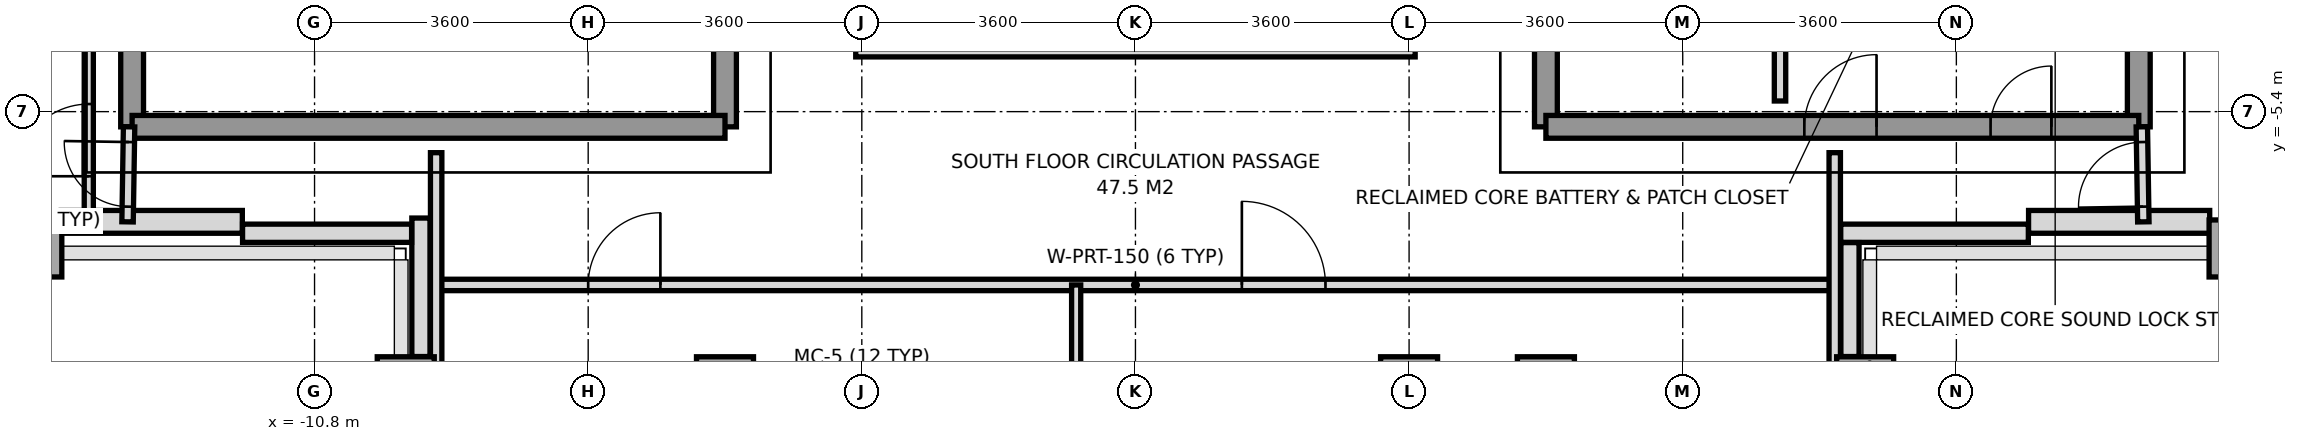
"""IFC4 building model, lengths in metres.
Left out: names, types, materials, properties, quantities, classifications, styles, units other than length and angle.
Written with IfcOpenShell. Run it as: python <this file> out.ifc"""

import sys

from ifc_helpers import new_model, si_unit, direction, frame, frame_2d, origin, origin_2d, place, context, subcontext, project, spatial, rectangle, extrude, source, transform, mapped, element, fill, save


model = new_model("IFC4")
c1 = context("Model", 3, precision=1e-05, world=origin(), true_north=direction((0.0, 1.0)))
c2 = subcontext(c1, "Body", "Model", "MODEL_VIEW")
j1 = project(units=[si_unit("LENGTHUNIT", "METRE"), si_unit("PLANEANGLEUNIT", "RADIAN")], contexts=[c1])
p1 = place(None, origin())
s1 = spatial("IfcSite", under=j1, at=p1, CompositionType="ELEMENT")
p2 = place(p1, origin())
s2 = spatial("IfcBuilding", under=s1, at=p2, CompositionType="ELEMENT")
p3 = place(p2, frame((0.0, 0.0, 233.2)))
s3 = spatial("IfcBuildingStorey", under=s2, at=p3, CompositionType="ELEMENT", Elevation=233.2)
m1 = source(origin(), c2, "Body", "SweptSolid", [
    extrude(rectangle(XDim=0.55, YDim=0.75, at=origin_2d()), origin(), (0.0, 0.0, 1.0), 3.01),
])
p4 = place(p3, frame((-14.4, -7.2, 0.0), z_axis=(0.0, 0.0, 1.0), x_axis=(1.0, 0.0, 0.0)))
e1 = element("IfcColumn", 1, at=p4, inside=s3, PredefinedType="COLUMN", context=c2, shape_type="MappedRepresentation", body=[
    mapped(m1, transform((0.0, 0.0, 0.0), x_axis=(1.0, 0.0, 0.0), y_axis=(0.0, 1.0, 0.0), z_axis=(0.0, 0.0, 1.0), scale=1.0)),
])
m2 = source(origin(), c2, "Body", "SweptSolid", [
    extrude(rectangle(XDim=0.75, YDim=0.75, at=origin_2d()), origin(), (0.0, 0.0, 1.0), 3.01),
])
for number, where, z_axis, x_axis in (
    (2, (-9.6, -9.0, 0.0), (0.0, 0.0, 1.0), (1.0, 0.0, 0.0)),
    (3, (-5.4, -9.0, 0.0), (0.0, 0.0, 1.0), (1.0, 0.0, 0.0)),
    (4, (-3.6, -9.0, 0.0), (0.0, 0.0, 1.0), (1.0, 0.0, 0.0)),
    (5, (3.6, -9.0, 0.0), (0.0, 0.0, 1.0), (1.0, 0.0, 0.0)),
    (6, (5.4, -9.0, 0.0), (0.0, 0.0, 1.0), (1.0, 0.0, 0.0)),
    (7, (9.6, -9.0, 0.0), (0.0, 0.0, 1.0), (1.0, 0.0, 0.0)),
):
    element("IfcColumn", number, at=place(p3, frame(where, z_axis=z_axis, x_axis=x_axis)), inside=s3, PredefinedType="COLUMN", context=c2, shape_type="MappedRepresentation", body=[
        mapped(m2, transform((0.0, 0.0, 0.0), x_axis=(1.0, 0.0, 0.0), y_axis=(0.0, 1.0, 0.0), z_axis=(0.0, 0.0, 1.0), scale=1.0)),
    ])
p5 = place(p3, frame((14.4, -7.2, 0.0), z_axis=(0.0, 0.0, 1.0), x_axis=(1.0, 0.0, 0.0)))
e8 = element("IfcColumn", 8, at=p5, inside=s3, PredefinedType="COLUMN", context=c2, shape_type="MappedRepresentation", body=[
    mapped(m1, transform((0.0, 0.0, 0.0), x_axis=(1.0, 0.0, 0.0), y_axis=(0.0, 1.0, 0.0), z_axis=(0.0, 0.0, 1.0), scale=1.0)),
])
for number, where, z_axis, x_axis in (
    (9, (-14.133, -6.85, 0.0), (0.0, 0.0, 1.0), (1.0, 0.0, 0.0)),
    (10, (11.75, -6.85, 0.0), (0.0, 0.0, 1.0), (1.0, 0.0, 0.0)),
):
    element("IfcWall", number, at=place(p3, frame(where, z_axis=z_axis, x_axis=x_axis)), inside=s3, PredefinedType="SOLIDWALL", context=c2, shape_type="SweptSolid", body=[
        extrude(rectangle(XDim=2.383, YDim=0.3, at=frame_2d((1.191, 0.0))), origin(), (0.0, 0.0, 1.0), 2.57),
    ])
p6 = place(p3, frame((11.747, -7.0, 0.0), z_axis=(0.0, 0.0, 1.0), x_axis=(-1.0, 0.0, 0.0)))
e11 = element("IfcWall", 11, at=p6, inside=s3, PredefinedType="PARAPET", context=c2, shape_type="SweptSolid", body=[
    extrude(rectangle(XDim=2.469, YDim=0.24, at=frame_2d((1.234, 0.0))), origin(), (0.0, 0.0, 1.0), 1.15),
])
p7 = place(p3, frame((9.4, -7.123, 0.0), z_axis=(0.0, 0.0, 1.0), x_axis=(0.0, -1.0, 0.0)))
e12 = element("IfcWall", 12, at=p7, inside=s3, PredefinedType="PARAPET", context=c2, shape_type="SweptSolid", body=[
    extrude(rectangle(XDim=1.499, YDim=0.24, at=frame_2d((0.75, 0.0))), origin(), (0.0, 0.0, 1.0), 1.15),
])
p8 = place(p3, frame((-9.4, -8.622, 0.0), z_axis=(0.0, 0.0, 1.0), x_axis=(0.0, 1.0, 0.0)))
e13 = element("IfcWall", 13, at=p8, inside=s3, PredefinedType="PARAPET", context=c2, shape_type="SweptSolid", body=[
    extrude(rectangle(XDim=1.822, YDim=0.24, at=frame_2d((0.911, 0.0))), origin(), (0.0, 0.0, 1.0), 1.15),
])
p9 = place(p3, frame((-9.523, -7.0, 0.0), z_axis=(0.0, 0.0, 1.0), x_axis=(-1.0, 0.0, 0.0)))
e14 = element("IfcWall", 14, at=p9, inside=s3, PredefinedType="PARAPET", context=c2, shape_type="SweptSolid", body=[
    extrude(rectangle(XDim=2.224, YDim=0.24, at=frame_2d((1.112, 0.0))), origin(), (0.0, 0.0, 1.0), 1.15),
])
p10 = place(p3, frame((-13.2, -5.6, 0.0), z_axis=(0.0, 0.0, 1.0), x_axis=(0.0, 1.0, 0.0)))
e15 = element("IfcWall", 15, at=p10, inside=s3, PredefinedType="SHEAR", context=c2, shape_type="SweptSolid", body=[
    extrude(rectangle(XDim=11.2, YDim=0.3, at=frame_2d((5.6, 0.0))), origin(), (0.0, 0.0, 1.0), 3.01),
])
p11 = place(p3, frame((-5.4, -5.6, 0.0), z_axis=(0.0, 0.0, 1.0), x_axis=(0.0, 1.0, 0.0)))
e16 = element("IfcWall", 16, at=p11, inside=s3, PredefinedType="SHEAR", context=c2, shape_type="SweptSolid", body=[
    extrude(rectangle(XDim=12.5, YDim=0.3, at=frame_2d((6.25, 0.0))), origin(), (0.0, 0.0, 1.0), 3.01),
])
p12 = place(p11, frame((4.55, 0.0, 0.0)))
e17 = element("IfcOpeningElement", 17, at=p12, cuts=e16, PredefinedType="OPENING", context=c2, shape_type="SweptSolid", body=[
    extrude(rectangle(XDim=1.2, YDim=2.2, at=frame_2d((0.6, 1.1))), frame((0.0, 0.16, 0.0), z_axis=(0.0, -1.0, 0.0), x_axis=(1.0, 0.0, 0.0)), (0.0, 0.0, 1.0), 0.32),
])
p13 = place(p11, frame((10.45, 0.0, 0.0)))
e18 = element("IfcOpeningElement", 18, at=p13, cuts=e16, PredefinedType="OPENING", context=c2, shape_type="SweptSolid", body=[
    extrude(rectangle(XDim=1.2, YDim=2.2, at=frame_2d((0.6, 1.1))), frame((0.0, 0.16, 0.0), z_axis=(0.0, -1.0, 0.0), x_axis=(1.0, 0.0, 0.0)), (0.0, 0.0, 1.0), 0.32),
])
p14 = place(p3, frame((-13.2, -5.6, 0.0), z_axis=(0.0, 0.0, 1.0), x_axis=(1.0, 0.0, 0.0)))
e19 = element("IfcWall", 19, at=p14, inside=s3, PredefinedType="SHEAR", context=c2, shape_type="SweptSolid", body=[
    extrude(rectangle(XDim=7.8, YDim=0.3, at=frame_2d((3.9, 0.0))), origin(), (0.0, 0.0, 1.0), 3.01),
])
p15 = place(p3, frame((13.2, -5.6, 0.0), z_axis=(0.0, 0.0, 1.0), x_axis=(0.0, 1.0, 0.0)))
e20 = element("IfcWall", 20, at=p15, inside=s3, PredefinedType="SHEAR", context=c2, shape_type="SweptSolid", body=[
    extrude(rectangle(XDim=11.2, YDim=0.3, at=frame_2d((5.6, 0.0))), origin(), (0.0, 0.0, 1.0), 3.01),
])
p16 = place(p3, frame((5.4, -5.6, 0.0), z_axis=(0.0, 0.0, 1.0), x_axis=(0.0, 1.0, 0.0)))
e21 = element("IfcWall", 21, at=p16, inside=s3, PredefinedType="SHEAR", context=c2, shape_type="SweptSolid", body=[
    extrude(rectangle(XDim=12.5, YDim=0.3, at=frame_2d((6.25, 0.0))), origin(), (0.0, 0.0, 1.0), 3.01),
])
p17 = place(p16, frame((4.55, 0.0, 0.0)))
e22 = element("IfcOpeningElement", 22, at=p17, cuts=e21, PredefinedType="OPENING", context=c2, shape_type="SweptSolid", body=[
    extrude(rectangle(XDim=1.2, YDim=2.2, at=frame_2d((0.6, 1.1))), frame((0.0, 0.16, 0.0), z_axis=(0.0, -1.0, 0.0), x_axis=(1.0, 0.0, 0.0)), (0.0, 0.0, 1.0), 0.32),
])
p18 = place(p16, frame((10.45, 0.0, 0.0)))
e23 = element("IfcOpeningElement", 23, at=p18, cuts=e21, PredefinedType="OPENING", context=c2, shape_type="SweptSolid", body=[
    extrude(rectangle(XDim=1.2, YDim=2.2, at=frame_2d((0.6, 1.1))), frame((0.0, 0.16, 0.0), z_axis=(0.0, -1.0, 0.0), x_axis=(1.0, 0.0, 0.0)), (0.0, 0.0, 1.0), 0.32),
])
p19 = place(p16, frame((7.88, 0.0, 0.0)))
e24 = element("IfcOpeningElement", 24, at=p19, cuts=e21, PredefinedType="OPENING", context=c2, shape_type="SweptSolid", body=[
    extrude(rectangle(XDim=0.8, YDim=2.1, at=frame_2d((0.4, 1.05))), frame((0.0, 0.16, 0.0), z_axis=(0.0, -1.0, 0.0), x_axis=(1.0, 0.0, 0.0)), (0.0, 0.0, 1.0), 0.32),
])
p20 = place(p3, frame((5.4, -5.6, 0.0), z_axis=(0.0, 0.0, 1.0), x_axis=(1.0, 0.0, 0.0)))
e25 = element("IfcWall", 25, at=p20, inside=s3, PredefinedType="SHEAR", context=c2, shape_type="SweptSolid", body=[
    extrude(rectangle(XDim=7.8, YDim=0.3, at=frame_2d((3.9, 0.0))), origin(), (0.0, 0.0, 1.0), 3.01),
])
p21 = place(p20, frame((5.85, 0.0, 0.0)))
e26 = element("IfcOpeningElement", 26, at=p21, cuts=e25, PredefinedType="OPENING", context=c2, shape_type="SweptSolid", body=[
    extrude(rectangle(XDim=0.8, YDim=2.1, at=frame_2d((0.4, 1.05))), frame((0.0, 0.16, 0.0), z_axis=(0.0, -1.0, 0.0), x_axis=(1.0, 0.0, 0.0)), (0.0, 0.0, 1.0), 0.32),
])
p22 = place(p20, frame((3.4, 0.0, 0.0)))
e27 = element("IfcOpeningElement", 27, at=p22, cuts=e25, PredefinedType="OPENING", context=c2, shape_type="SweptSolid", body=[
    extrude(rectangle(XDim=0.95, YDim=2.15, at=frame_2d((0.475, 1.075))), frame((0.0, 0.16, 0.0), z_axis=(0.0, -1.0, 0.0), x_axis=(1.0, 0.0, 0.0)), (0.0, 0.0, 1.0), 0.32),
])
p23 = place(p3, frame((8.48, -5.26, 0.0), z_axis=(0.0, 0.0, 1.0), x_axis=(0.0, 1.0, 0.0)))
e28 = element("IfcWall", 28, at=p23, inside=s3, PredefinedType="PARTITIONING", context=c2, shape_type="SweptSolid", body=[
    extrude(rectangle(XDim=2.94, YDim=0.15, at=frame_2d((1.47, 0.0))), origin(), (0.0, 0.0, 1.0), 3.01),
])
p24 = place(p3, frame((-9.2, -7.68, 0.0), z_axis=(0.0, 0.0, 1.0), x_axis=(1.0, 0.0, 0.0)))
e29 = element("IfcWall", 29, at=p24, inside=s3, PredefinedType="PARTITIONING", context=c2, shape_type="SweptSolid", body=[
    extrude(rectangle(XDim=18.4, YDim=0.15, at=frame_2d((9.2, 0.0))), origin(), (0.0, 0.0, 1.0), 2.57),
])
p25 = place(p24, frame((2.0, 0.0, 0.0)))
e30 = element("IfcOpeningElement", 30, at=p25, cuts=e29, PredefinedType="OPENING", context=c2, shape_type="SweptSolid", body=[
    extrude(rectangle(XDim=0.95, YDim=2.15, at=frame_2d((0.475, 1.075))), frame((0.0, 0.085, 0.0), z_axis=(0.0, -1.0, 0.0), x_axis=(1.0, 0.0, 0.0)), (0.0, 0.0, 1.0), 0.17),
])
p26 = place(p24, frame((10.6, 0.0, 0.0)))
e31 = element("IfcOpeningElement", 31, at=p26, cuts=e29, PredefinedType="OPENING", context=c2, shape_type="SweptSolid", body=[
    extrude(rectangle(XDim=1.1, YDim=2.2, at=frame_2d((0.55, 1.1))), frame((0.0, 0.085, 0.0), z_axis=(0.0, -1.0, 0.0), x_axis=(1.0, 0.0, 0.0)), (0.0, 0.0, 1.0), 0.17),
])
for number, where, z_axis, x_axis in (
    (32, (-9.2, -10.28, 0.0), (0.0, 0.0, 1.0), (0.0, 1.0, 0.0)),
    (33, (9.2, -10.28, 0.0), (0.0, 0.0, 1.0), (0.0, 1.0, 0.0)),
):
    element("IfcWall", number, at=place(p3, frame(where, z_axis=z_axis, x_axis=x_axis)), inside=s3, PredefinedType="PARTITIONING", context=c2, shape_type="SweptSolid", body=[
        extrude(rectangle(XDim=4.34, YDim=0.15, at=frame_2d((2.17, 0.0))), origin(), (0.0, 0.0, 1.0), 2.61),
    ])
p27 = place(p3, frame((-0.78, -19.25, 0.0), z_axis=(0.0, 0.0, 1.0), x_axis=(0.0, 1.0, 0.0)))
e34 = element("IfcWall", 34, at=p27, inside=s3, PredefinedType="PARTITIONING", context=c2, shape_type="SweptSolid", body=[
    extrude(rectangle(XDim=11.57, YDim=0.12, at=frame_2d((5.785, 0.0))), origin(), (0.0, 0.0, 1.0), 2.61),
])
p28 = place(p3, frame((-13.26, -6.85, 0.0), z_axis=(0.0, 0.0, 1.0), x_axis=(0.016013571389, 0.999871774545, 0.0)))
e35 = element("IfcWall", 35, at=p28, inside=s3, PredefinedType="PARTITIONING", context=c2, shape_type="SweptSolid", body=[
    extrude(rectangle(XDim=1.25, YDim=0.15, at=frame_2d((0.625, 0.0))), origin(), (0.0, 0.0, 1.0), 3.01),
])
p29 = place(p28, frame((0.2, 0.0, 0.0)))
e36 = element("IfcOpeningElement", 36, at=p29, cuts=e35, PredefinedType="OPENING", context=c2, shape_type="SweptSolid", body=[
    extrude(rectangle(XDim=0.85, YDim=2.1, at=frame_2d((0.425, 1.05))), frame((0.0, 0.085, 0.0), z_axis=(0.0, -1.0, 0.0), x_axis=(1.0, 0.0, 0.0)), (0.0, 0.0, 1.0), 0.17),
])
p30 = place(p3, frame((-13.77, -6.85, 0.0), z_axis=(0.0, 0.0, 1.0), x_axis=(0.0, 1.0, 0.0)))
e37 = element("IfcWall", 37, at=p30, inside=s3, PredefinedType="PARTITIONING", context=c2, shape_type="SweptSolid", body=[
    extrude(rectangle(XDim=13.7, YDim=0.12, at=frame_2d((6.85, 0.0))), origin(), (0.0, 0.0, 1.0), 2.71),
])
p31 = place(p30, frame((0.6, 0.0, 0.0)))
e38 = element("IfcOpeningElement", 38, at=p31, cuts=e37, PredefinedType="OPENING", context=c2, shape_type="SweptSolid", body=[
    extrude(rectangle(XDim=0.95, YDim=2.15, at=frame_2d((0.475, 1.075))), frame((0.0, 0.07, 0.0), z_axis=(0.0, -1.0, 0.0), x_axis=(1.0, 0.0, 0.0)), (0.0, 0.0, 1.0), 0.14),
])
p32 = place(p3, frame((13.26, -6.85, 0.0), z_axis=(0.0, 0.0, 1.0), x_axis=(-0.016013571389, 0.999871774545, 0.0)))
e39 = element("IfcWall", 39, at=p32, inside=s3, PredefinedType="PARTITIONING", context=c2, shape_type="SweptSolid", body=[
    extrude(rectangle(XDim=1.25, YDim=0.15, at=frame_2d((0.625, 0.0))), origin(), (0.0, 0.0, 1.0), 3.01),
])
p33 = place(p32, frame((0.2, 0.0, 0.0)))
e40 = element("IfcOpeningElement", 40, at=p33, cuts=e39, PredefinedType="OPENING", context=c2, shape_type="SweptSolid", body=[
    extrude(rectangle(XDim=0.85, YDim=2.1, at=frame_2d((0.425, 1.05))), frame((0.0, 0.085, 0.0), z_axis=(0.0, -1.0, 0.0), x_axis=(1.0, 0.0, 0.0)), (0.0, 0.0, 1.0), 0.17),
])
p34 = place(p3, frame((-3.68, -4.56, 0.0), z_axis=(0.0, 0.0, 1.0), x_axis=(1.0, 0.0, 0.0)))
e41 = element("IfcWall", 41, at=p34, inside=s3, PredefinedType="PARAPET", context=c2, shape_type="SweptSolid", body=[
    extrude(rectangle(XDim=7.36, YDim=0.24, at=frame_2d((3.68, 0.0))), origin(), (0.0, 0.0, 1.0), 1.15),
])
m3 = source(origin(), c2, "Body", "SweptSolid", [
    extrude(rectangle(XDim=0.8, YDim=2.1, at=frame_2d((0.4, 1.05))), frame((0.0, 0.025, 0.0), z_axis=(0.0, -1.0, 0.0), x_axis=(1.0, 0.0, 0.0)), (0.0, 0.0, 1.0), 0.05),
])
p35 = place(p21, origin())
e42 = element("IfcDoor", 42, at=p35, inside=s3, OperationType="SINGLE_SWING_RIGHT", PredefinedType="DOOR", context=c2, shape_type="MappedRepresentation", body=[
    mapped(m3, transform((0.0, 0.0, 0.0), x_axis=(1.0, 0.0, 0.0), y_axis=(0.0, 1.0, 0.0), z_axis=(0.0, 0.0, 1.0), scale=1.0)),
])
fill(e26, e42)
m4 = source(origin(), c2, "Body", "SweptSolid", [
    extrude(rectangle(XDim=0.95, YDim=2.15, at=frame_2d((0.475, 1.075))), frame((0.0, 0.025, 0.0), z_axis=(0.0, -1.0, 0.0), x_axis=(1.0, 0.0, 0.0)), (0.0, 0.0, 1.0), 0.05),
])
p36 = place(p22, origin())
e43 = element("IfcDoor", 43, at=p36, inside=s3, OperationType="SINGLE_SWING_RIGHT", PredefinedType="DOOR", context=c2, shape_type="MappedRepresentation", body=[
    mapped(m4, transform((0.0, 0.0, 0.0), x_axis=(1.0, 0.0, 0.0), y_axis=(0.0, 1.0, 0.0), z_axis=(0.0, 0.0, 1.0), scale=1.0)),
])
fill(e27, e43)
p37 = place(p25, origin())
e44 = element("IfcDoor", 44, at=p37, inside=s3, OperationType="SINGLE_SWING_RIGHT", PredefinedType="DOOR", context=c2, shape_type="MappedRepresentation", body=[
    mapped(m4, transform((0.0, 0.0, 0.0), x_axis=(1.0, 0.0, 0.0), y_axis=(0.0, 1.0, 0.0), z_axis=(0.0, 0.0, 1.0), scale=1.0)),
])
fill(e30, e44)
m5 = source(origin(), c2, "Body", "SweptSolid", [
    extrude(rectangle(XDim=1.1, YDim=2.2, at=frame_2d((0.55, 1.1))), frame((0.0, 0.025, 0.0), z_axis=(0.0, -1.0, 0.0), x_axis=(1.0, 0.0, 0.0)), (0.0, 0.0, 1.0), 0.05),
])
p38 = place(p26, origin())
e45 = element("IfcDoor", 45, at=p38, inside=s3, OperationType="SINGLE_SWING_LEFT", PredefinedType="DOOR", context=c2, shape_type="MappedRepresentation", body=[
    mapped(m5, transform((0.0, 0.0, 0.0), x_axis=(1.0, 0.0, 0.0), y_axis=(0.0, 1.0, 0.0), z_axis=(0.0, 0.0, 1.0), scale=1.0)),
])
fill(e31, e45)
p39 = place(p31, origin())
e46 = element("IfcDoor", 46, at=p39, inside=s3, OperationType="SINGLE_SWING_LEFT", PredefinedType="DOOR", context=c2, shape_type="MappedRepresentation", body=[
    mapped(m4, transform((0.0, 0.0, 0.0), x_axis=(1.0, 0.0, 0.0), y_axis=(0.0, 1.0, 0.0), z_axis=(0.0, 0.0, 1.0), scale=1.0)),
])
fill(e38, e46)
m6 = source(origin(), c2, "Body", "SweptSolid", [
    extrude(rectangle(XDim=0.85, YDim=2.1, at=frame_2d((0.425, 1.05))), frame((0.0, 0.025, 0.0), z_axis=(0.0, -1.0, 0.0), x_axis=(1.0, 0.0, 0.0)), (0.0, 0.0, 1.0), 0.05),
])
p40 = place(p29, origin())
e47 = element("IfcDoor", 47, at=p40, inside=s3, OperationType="SINGLE_SWING_RIGHT", PredefinedType="DOOR", context=c2, shape_type="MappedRepresentation", body=[
    mapped(m6, transform((0.0, 0.0, 0.0), x_axis=(1.0, 0.0, 0.0), y_axis=(0.0, 1.0, 0.0), z_axis=(0.0, 0.0, 1.0), scale=1.0)),
])
fill(e36, e47)
p41 = place(p33, origin())
e48 = element("IfcDoor", 48, at=p41, inside=s3, OperationType="SINGLE_SWING_LEFT", PredefinedType="DOOR", context=c2, shape_type="MappedRepresentation", body=[
    mapped(m6, transform((0.0, 0.0, 0.0), x_axis=(1.0, 0.0, 0.0), y_axis=(0.0, 1.0, 0.0), z_axis=(0.0, 0.0, 1.0), scale=1.0)),
])
fill(e40, e48)
save(model, sys.argv[1])
